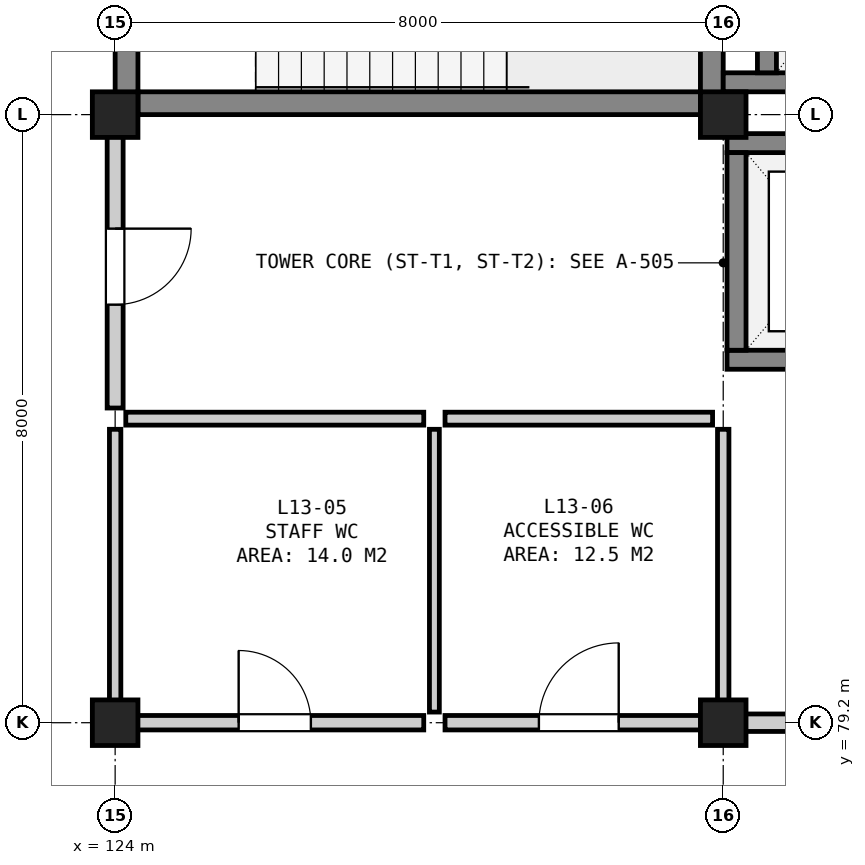
"""IFC4 building model, lengths in metres.
Left out: names, types, materials, properties, quantities, classifications, styles, units other than length and angle.
Written with IfcOpenShell. Run it as: python <this file> out.ifc"""

import sys

from ifc_helpers import new_model, si_unit, direction, frame, frame_2d, origin, origin_2d, place, context, subcontext, project, spatial, rectangle, extrude, element, fill, save


model = new_model("IFC4")
c1 = context("Model", 3, precision=1e-05, world=origin(), true_north=direction((0.0, 1.0)))
c2 = subcontext(c1, "Body", "Model", "MODEL_VIEW")
j1 = project(units=[si_unit("LENGTHUNIT", "METRE"), si_unit("PLANEANGLEUNIT", "RADIAN")], contexts=[c1])
p1 = place(None, origin())
s1 = spatial("IfcSite", under=j1, at=p1, CompositionType="ELEMENT")
p2 = place(p1, origin())
s2 = spatial("IfcBuilding", under=s1, at=p2, CompositionType="ELEMENT")
p3 = place(p2, frame((0.0, 0.0, 54.8)))
s3 = spatial("IfcBuildingStorey", under=s2, at=p3, CompositionType="ELEMENT", Elevation=54.8)
for number, where, z_axis, x_axis in (
    (1, (124.0, 79.2, 0.0), (0.0, 0.0, 1.0), (1.0, 0.0, 0.0)),
    (2, (124.0, 87.2, 0.0), (0.0, 0.0, 1.0), (1.0, 0.0, 0.0)),
    (3, (132.0, 79.2, 0.0), (0.0, 0.0, 1.0), (1.0, 0.0, 0.0)),
    (4, (132.0, 87.2, 0.0), (0.0, 0.0, 1.0), (1.0, 0.0, 0.0)),
):
    element("IfcColumn", number, at=place(p3, frame(where, z_axis=z_axis, x_axis=x_axis)), inside=s3, PredefinedType="COLUMN", context=c2, shape_type="SweptSolid", body=[
        extrude(rectangle(XDim=0.6, YDim=0.6, at=origin_2d()), origin(), (0.0, 0.0, 1.0), 3.9),
    ])
for number, where, z_axis, x_axis in (
    (5, (124.15, 87.2, 0.0), (0.0, 0.0, 1.0), (0.0, 1.0, 0.0)),
    (6, (131.85, 87.2, 0.0), (0.0, 0.0, 1.0), (0.0, 1.0, 0.0)),
):
    element("IfcWall", number, at=place(p3, frame(where, z_axis=z_axis, x_axis=x_axis)), inside=s3, PredefinedType="SHEAR", context=c2, shape_type="SweptSolid", body=[
        extrude(rectangle(XDim=4.2, YDim=0.3, at=frame_2d((2.1, 0.0))), origin(), (0.0, 0.0, 1.0), 3.62),
    ])
p4 = place(p3, frame((124.3, 87.35, 0.0), z_axis=(0.0, 0.0, 1.0), x_axis=(1.0, 0.0, 0.0)))
e7 = element("IfcWall", 7, at=p4, inside=s3, PredefinedType="SHEAR", context=c2, shape_type="SweptSolid", body=[
    extrude(rectangle(XDim=7.4, YDim=0.3, at=frame_2d((3.7, 0.0))), origin(), (0.0, 0.0, 1.0), 3.62),
])
p5 = place(p3, frame((132.0, 87.625, 0.0), z_axis=(0.0, 0.0, 1.0), x_axis=(1.0, 0.0, 0.0)))
e8 = element("IfcWall", 8, at=p5, inside=s3, PredefinedType="SHEAR", context=c2, shape_type="SweptSolid", body=[
    extrude(rectangle(XDim=3.15, YDim=0.25, at=frame_2d((1.575, 0.0))), origin(), (0.0, 0.0, 1.0), 3.62),
])
p6 = place(p3, frame((132.575, 87.75, 0.0), z_axis=(0.0, 0.0, 1.0), x_axis=(0.0, 1.0, 0.0)))
e9 = element("IfcWall", 9, at=p6, inside=s3, PredefinedType="SHEAR", context=c2, shape_type="SweptSolid", body=[
    extrude(rectangle(XDim=2.9, YDim=0.25, at=frame_2d((1.45, 0.0))), origin(), (0.0, 0.0, 1.0), 3.62),
])
p7 = place(p3, frame((132.05, 83.975, 0.0), z_axis=(0.0, 0.0, 1.0), x_axis=(1.0, 0.0, 0.0)))
e10 = element("IfcWall", 10, at=p7, inside=s3, PredefinedType="SHEAR", context=c2, shape_type="SweptSolid", body=[
    extrude(rectangle(XDim=2.7, YDim=0.25, at=frame_2d((1.35, 0.0))), origin(), (0.0, 0.0, 1.0), 3.62),
])
p8 = place(p7, frame((0.8, 0.0, 0.0)))
e11 = element("IfcOpeningElement", 11, at=p8, cuts=e10, PredefinedType="OPENING", context=c2, shape_type="SweptSolid", body=[
    extrude(rectangle(XDim=1.1, YDim=2.15, at=frame_2d((0.55, 1.075))), frame((0.0, 0.137, 0.0), z_axis=(0.0, -1.0, 0.0), x_axis=(1.0, 0.0, 0.0)), (0.0, 0.0, 1.0), 0.274),
])
p9 = place(p3, frame((132.05, 86.825, 0.0), z_axis=(0.0, 0.0, 1.0), x_axis=(1.0, 0.0, 0.0)))
e12 = element("IfcWall", 12, at=p9, inside=s3, PredefinedType="SHEAR", context=c2, shape_type="SweptSolid", body=[
    extrude(rectangle(XDim=2.7, YDim=0.25, at=frame_2d((1.35, 0.0))), origin(), (0.0, 0.0, 1.0), 3.62),
])
p10 = place(p3, frame((132.175, 84.1, 0.0), z_axis=(0.0, 0.0, 1.0), x_axis=(0.0, 1.0, 0.0)))
e13 = element("IfcWall", 13, at=p10, inside=s3, PredefinedType="SHEAR", context=c2, shape_type="SweptSolid", body=[
    extrude(rectangle(XDim=2.6, YDim=0.25, at=frame_2d((1.3, 0.0))), origin(), (0.0, 0.0, 1.0), 3.62),
])
p11 = place(p3, frame((124.14, 79.2, 0.0), z_axis=(0.0, 0.0, 1.0), x_axis=(1.0, 0.0, 0.0)))
e14 = element("IfcWall", 14, at=p11, inside=s3, PredefinedType="PARTITIONING", context=c2, shape_type="SweptSolid", body=[
    extrude(rectangle(XDim=3.92, YDim=0.19, at=frame_2d((1.96, 0.0))), origin(), (0.0, 0.0, 1.0), 3.005),
])
p12 = place(p11, frame((1.485, 0.0, 0.0)))
e15 = element("IfcOpeningElement", 15, at=p12, cuts=e14, PredefinedType="OPENING", context=c2, shape_type="SweptSolid", body=[
    extrude(rectangle(XDim=0.95, YDim=2.15, at=frame_2d((0.475, 1.075))), frame((0.0, 0.107, 0.0), z_axis=(0.0, -1.0, 0.0), x_axis=(1.0, 0.0, 0.0)), (0.0, 0.0, 1.0), 0.214),
])
p13 = place(p3, frame((124.14, 83.2, 0.0), z_axis=(0.0, 0.0, 1.0), x_axis=(1.0, 0.0, 0.0)))
e16 = element("IfcWall", 16, at=p13, inside=s3, PredefinedType="PARTITIONING", context=c2, shape_type="SweptSolid", body=[
    extrude(rectangle(XDim=3.92, YDim=0.17, at=frame_2d((1.96, 0.0))), origin(), (0.0, 0.0, 1.0), 3.62),
])
p14 = place(p3, frame((124.0, 79.34, 0.0), z_axis=(0.0, 0.0, 1.0), x_axis=(0.0, 1.0, 0.0)))
e17 = element("IfcWall", 17, at=p14, inside=s3, PredefinedType="PARTITIONING", context=c2, shape_type="SweptSolid", body=[
    extrude(rectangle(XDim=3.72, YDim=0.15, at=frame_2d((1.86, 0.0))), origin(), (0.0, 0.0, 1.0), 3.055),
])
p15 = place(p3, frame((128.2, 79.34, 0.0), z_axis=(0.0, 0.0, 1.0), x_axis=(0.0, 1.0, 0.0)))
e18 = element("IfcWall", 18, at=p15, inside=s3, PredefinedType="PARTITIONING", context=c2, shape_type="SweptSolid", body=[
    extrude(rectangle(XDim=3.72, YDim=0.13, at=frame_2d((1.86, 0.0))), origin(), (0.0, 0.0, 1.0), 3.62),
])
p16 = place(p3, frame((128.34, 79.2, 0.0), z_axis=(0.0, 0.0, 1.0), x_axis=(1.0, 0.0, 0.0)))
e19 = element("IfcWall", 19, at=p16, inside=s3, PredefinedType="PARTITIONING", context=c2, shape_type="SweptSolid", body=[
    extrude(rectangle(XDim=3.52, YDim=0.19, at=frame_2d((1.76, 0.0))), origin(), (0.0, 0.0, 1.0), 3.005),
])
p17 = place(p16, frame((1.235, 0.0, 0.0)))
e20 = element("IfcOpeningElement", 20, at=p17, cuts=e19, PredefinedType="OPENING", context=c2, shape_type="SweptSolid", body=[
    extrude(rectangle(XDim=1.05, YDim=2.15, at=frame_2d((0.525, 1.075))), frame((0.0, 0.107, 0.0), z_axis=(0.0, -1.0, 0.0), x_axis=(1.0, 0.0, 0.0)), (0.0, 0.0, 1.0), 0.214),
])
p18 = place(p3, frame((128.34, 83.2, 0.0), z_axis=(0.0, 0.0, 1.0), x_axis=(1.0, 0.0, 0.0)))
e21 = element("IfcWall", 21, at=p18, inside=s3, PredefinedType="PARTITIONING", context=c2, shape_type="SweptSolid", body=[
    extrude(rectangle(XDim=3.52, YDim=0.17, at=frame_2d((1.76, 0.0))), origin(), (0.0, 0.0, 1.0), 3.62),
])
p19 = place(p3, frame((132.0, 79.34, 0.0), z_axis=(0.0, 0.0, 1.0), x_axis=(0.0, 1.0, 0.0)))
e22 = element("IfcWall", 22, at=p19, inside=s3, PredefinedType="PARTITIONING", context=c2, shape_type="SweptSolid", body=[
    extrude(rectangle(XDim=3.72, YDim=0.15, at=frame_2d((1.86, 0.0))), origin(), (0.0, 0.0, 1.0), 3.205),
])
p20 = place(p3, frame((124.0, 83.34, 0.0), z_axis=(0.0, 0.0, 1.0), x_axis=(0.0, 1.0, 0.0)))
e23 = element("IfcWall", 23, at=p20, inside=s3, PredefinedType="SOLIDWALL", context=c2, shape_type="SweptSolid", body=[
    extrude(rectangle(XDim=3.72, YDim=0.21, at=frame_2d((1.86, 0.0))), origin(), (0.0, 0.0, 1.0), 3.055),
])
p21 = place(p20, frame((1.36, 0.0, 0.0)))
e24 = element("IfcOpeningElement", 24, at=p21, cuts=e23, PredefinedType="OPENING", context=c2, shape_type="SweptSolid", body=[
    extrude(rectangle(XDim=1.0, YDim=2.15, at=frame_2d((0.5, 1.075))), frame((0.0, 0.117, 0.0), z_axis=(0.0, -1.0, 0.0), x_axis=(1.0, 0.0, 0.0)), (0.0, 0.0, 1.0), 0.234),
])
p22 = place(p3, frame((132.14, 79.2, 0.0), z_axis=(0.0, 0.0, 1.0), x_axis=(1.0, 0.0, 0.0)))
e25 = element("IfcWall", 25, at=p22, inside=s3, PredefinedType="SOLIDWALL", context=c2, shape_type="SweptSolid", body=[
    extrude(rectangle(XDim=7.72, YDim=0.23, at=frame_2d((3.86, 0.0))), origin(), (0.0, 0.0, 1.0), 3.055),
])
p23 = place(p22, frame((3.11, 0.0, 0.0)))
e26 = element("IfcOpeningElement", 26, at=p23, cuts=e25, PredefinedType="OPENING", context=c2, shape_type="SweptSolid", body=[
    extrude(rectangle(XDim=1.5, YDim=2.2, at=frame_2d((0.75, 1.1))), frame((0.0, 0.127, 0.0), z_axis=(0.0, -1.0, 0.0), x_axis=(1.0, 0.0, 0.0)), (0.0, 0.0, 1.0), 0.254),
])
p24 = place(p12, origin())
e27 = element("IfcDoor", 27, at=p24, inside=s3, OperationType="SINGLE_SWING_LEFT", PredefinedType="DOOR", context=c2, shape_type="SweptSolid", body=[
    extrude(rectangle(XDim=0.95, YDim=2.15, at=frame_2d((0.475, 1.075))), frame((0.0, 0.025, 0.0), z_axis=(0.0, -1.0, 0.0), x_axis=(1.0, 0.0, 0.0)), (0.0, 0.0, 1.0), 0.05),
])
fill(e15, e27)
p25 = place(p17, origin())
e28 = element("IfcDoor", 28, at=p25, inside=s3, OperationType="SINGLE_SWING_RIGHT", PredefinedType="DOOR", context=c2, shape_type="SweptSolid", body=[
    extrude(rectangle(XDim=1.05, YDim=2.15, at=frame_2d((0.525, 1.075))), frame((0.0, 0.025, 0.0), z_axis=(0.0, -1.0, 0.0), x_axis=(1.0, 0.0, 0.0)), (0.0, 0.0, 1.0), 0.05),
])
fill(e20, e28)
p26 = place(p21, frame((1.0, 0.0, 0.0), z_axis=(0.0, 0.0, 1.0), x_axis=(-1.0, 0.0, 0.0)))
e29 = element("IfcDoor", 29, at=p26, inside=s3, OperationType="SINGLE_SWING_LEFT", PredefinedType="DOOR", context=c2, shape_type="SweptSolid", body=[
    extrude(rectangle(XDim=1.0, YDim=2.15, at=frame_2d((0.5, 1.075))), frame((0.0, 0.025, 0.0), z_axis=(0.0, -1.0, 0.0), x_axis=(1.0, 0.0, 0.0)), (0.0, 0.0, 1.0), 0.05),
])
fill(e24, e29)
save(model, sys.argv[1])
